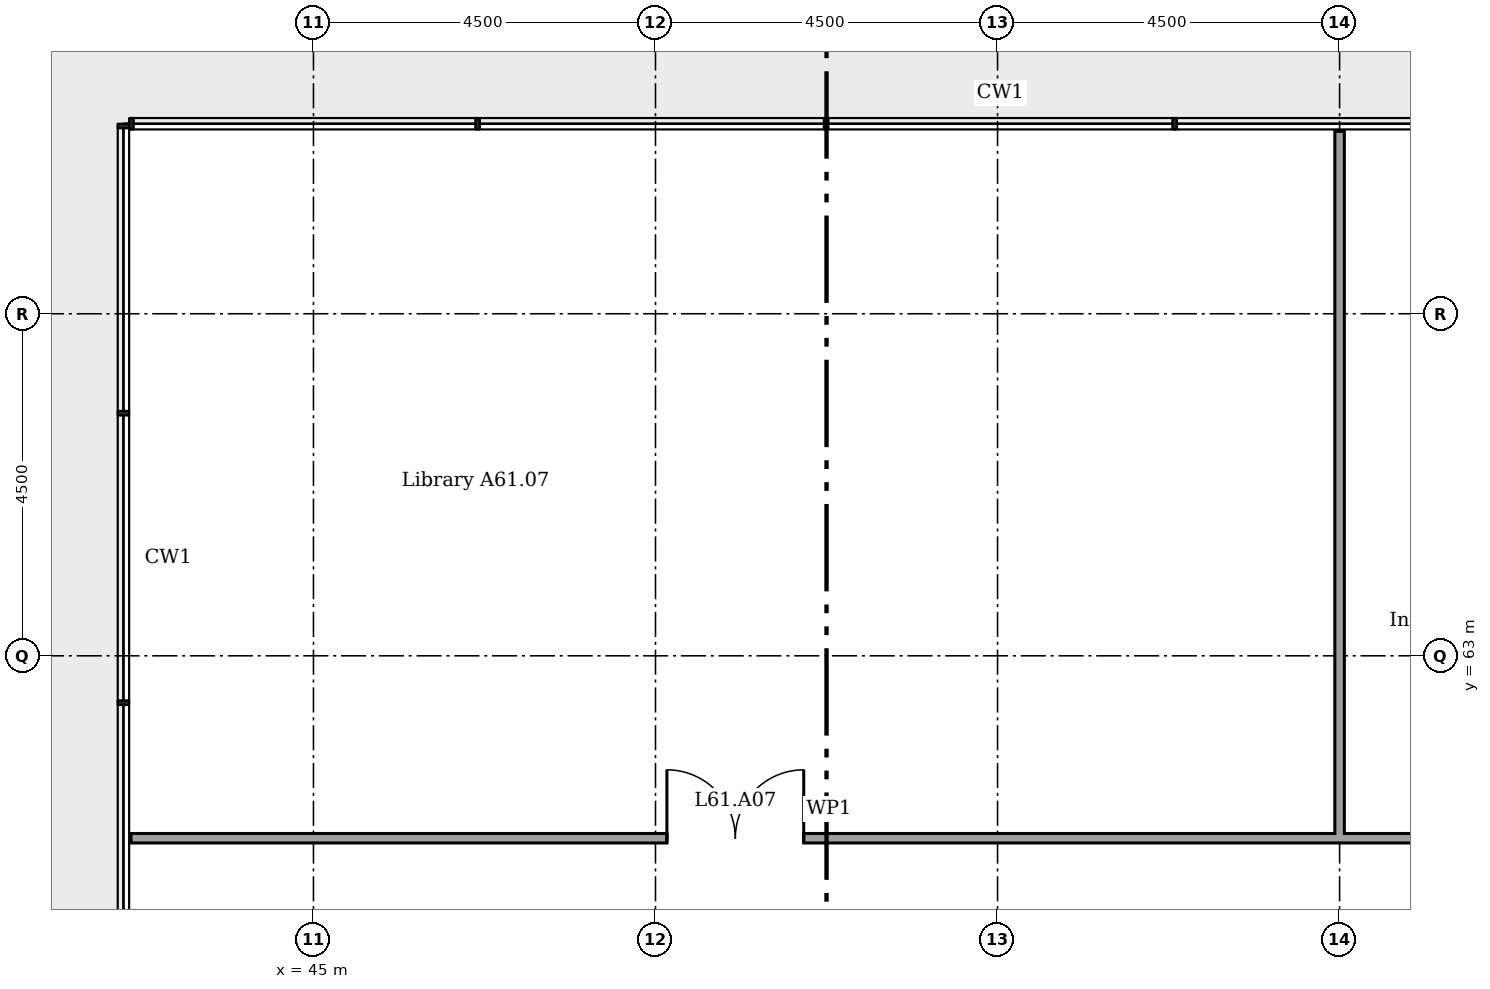
"""IFC4 building model, lengths in metres.
Left out: names, types, materials, properties, quantities, classifications, styles, units other than length and angle.
Written with IfcOpenShell. Run it as: python <this file> out.ifc"""

import sys

from ifc_helpers import new_model, si_unit, direction, frame, frame_2d, origin, place, context, subcontext, project, spatial, rectangle, extrude, element, fill, save


model = new_model("IFC4")
c1 = context("Model", 3, precision=1e-05, world=origin(), true_north=direction((0.0, 1.0)))
c2 = subcontext(c1, "Body", "Model", "MODEL_VIEW")
j1 = project(units=[si_unit("LENGTHUNIT", "METRE"), si_unit("PLANEANGLEUNIT", "RADIAN")], contexts=[c1])
p1 = place(None, origin())
s1 = spatial("IfcSite", under=j1, at=p1, CompositionType="ELEMENT")
p2 = place(p1, origin())
s2 = spatial("IfcBuilding", under=s1, at=p2, CompositionType="ELEMENT")
p3 = place(p2, frame((0.0, 0.0, 238.8)))
s3 = spatial("IfcBuildingStorey", under=s2, at=p3, CompositionType="ELEMENT", Elevation=238.8)
p4 = place(p3, frame((42.6, 60.6, 0.0)))
e1 = element("IfcWall", 1, at=p4, inside=s3, PredefinedType="PARTITIONING", context=c2, shape_type="SweptSolid", body=[
    extrude(rectangle(XDim=18.362, YDim=0.125, at=frame_2d((9.181, 0.0))), origin(), (0.0, 0.0, 1.0), 3.45),
])
p5 = place(p4, frame((7.05, 0.0, 0.0)))
e2 = element("IfcOpeningElement", 2, at=p5, cuts=e1, PredefinedType="OPENING", context=c2, shape_type="SweptSolid", body=[
    extrude(rectangle(XDim=1.8, YDim=2.1, at=frame_2d((0.9, 1.05))), frame((0.0, 0.073, 0.0), z_axis=(0.0, -1.0, 0.0), x_axis=(1.0, 0.0, 0.0)), (0.0, 0.0, 1.0), 0.145),
])
p6 = place(p3, frame((58.5, 60.6, 0.0), z_axis=(0.0, 0.0, 1.0), x_axis=(0.0, 1.0, 0.0)))
e3 = element("IfcWall", 3, at=p6, inside=s3, PredefinedType="PARTITIONING", context=c2, shape_type="SweptSolid", body=[
    extrude(rectangle(XDim=9.3, YDim=0.125, at=frame_2d((4.65, 0.0))), origin(), (0.0, 0.0, 1.0), 2.772),
])
p7 = place(p5, origin())
e4 = element("IfcDoor", 4, at=p7, inside=s3, OperationType="DOUBLE_DOOR_SINGLE_SWING", PredefinedType="DOOR", context=c2, shape_type="SweptSolid", body=[
    extrude(rectangle(XDim=1.8, YDim=2.1, at=frame_2d((0.9, 1.05))), frame((0.0, 0.025, 0.0), z_axis=(0.0, -1.0, 0.0), x_axis=(1.0, 0.0, 0.0)), (0.0, 0.0, 1.0), 0.05),
])
fill(e2, e4)
save(model, sys.argv[1])
